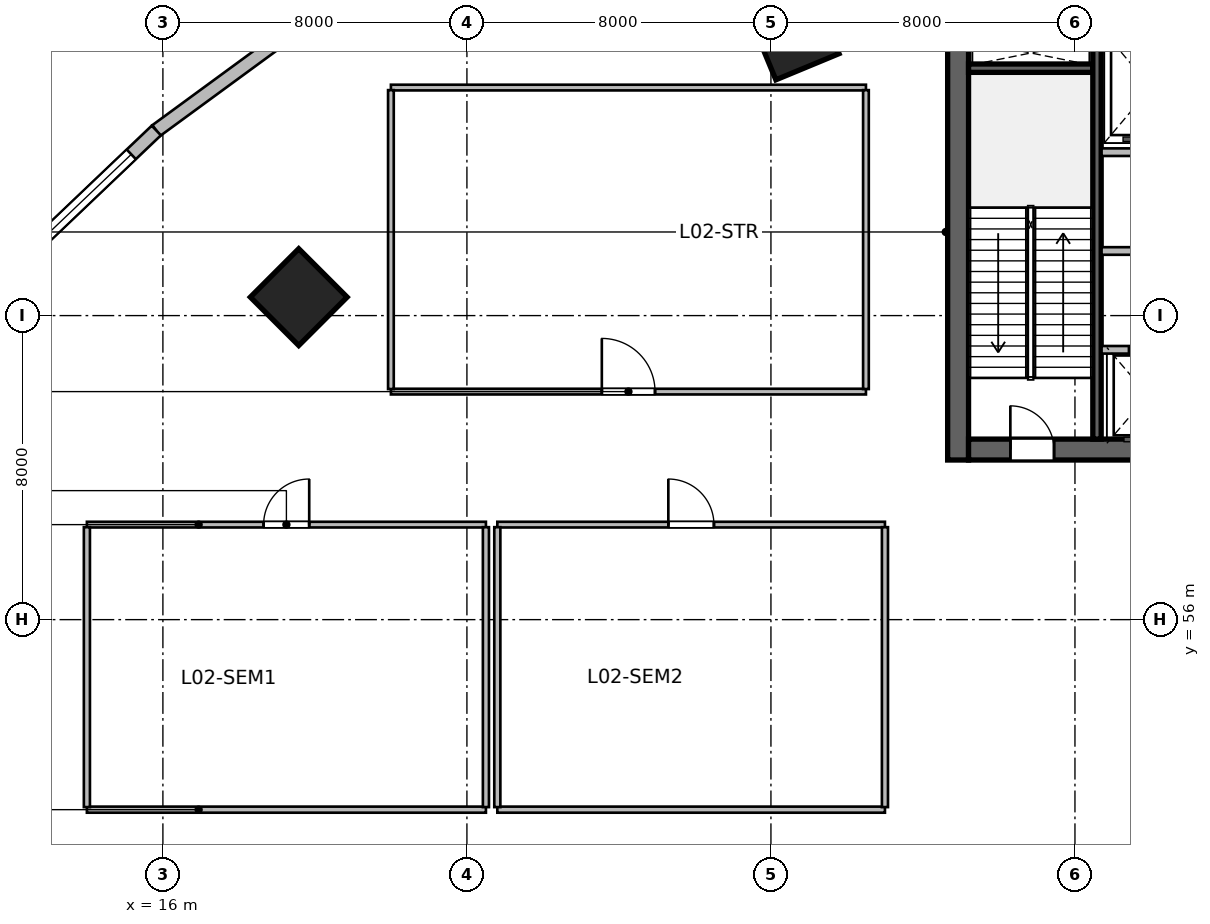
"""IFC4 building model, lengths in metres.
Left out: names, types, materials, properties, quantities, classifications, styles, units other than length and angle.
Written with IfcOpenShell. Run it as: python <this file> out.ifc"""

import sys

from ifc_helpers import new_model, si_unit, direction, frame, frame_2d, origin, origin_2d, place, context, subcontext, project, spatial, rectangle, extrude, source, transform, mapped, element, fill, save


model = new_model("IFC4")
c1 = context("Model", 3, precision=1e-05, world=origin(), true_north=direction((0.0, 1.0)))
c2 = subcontext(c1, "Body", "Model", "MODEL_VIEW")
j1 = project(units=[si_unit("LENGTHUNIT", "METRE"), si_unit("PLANEANGLEUNIT", "RADIAN")], contexts=[c1])
p1 = place(None, origin())
s1 = spatial("IfcSite", under=j1, at=p1, CompositionType="ELEMENT")
p2 = place(p1, origin())
s2 = spatial("IfcBuilding", under=s1, at=p2, CompositionType="ELEMENT")
p3 = place(p2, frame((0.0, 0.0, 12.0)))
s3 = spatial("IfcBuildingStorey", under=s2, at=p3, CompositionType="ELEMENT", Elevation=12.0)
m1 = source(origin(), c2, "Body", "SweptSolid", [
    extrude(rectangle(XDim=12.0, YDim=0.55, at=frame_2d((6.0, 0.0))), origin(), (0.0, 0.0, 1.0), 6.0),
])
p4 = place(p3, frame((36.925, 60.2, 0.0), z_axis=(0.0, 0.0, 1.0), x_axis=(0.0, 1.0, 0.0)))
e1 = element("IfcWall", 1, at=p4, inside=s3, PredefinedType="SHEAR", context=c2, shape_type="MappedRepresentation", body=[
    mapped(m1, transform((0.0, 0.0, 0.0), scale=1.0)),
])
m2 = source(origin(), c2, "Body", "SweptSolid", [
    extrude(rectangle(XDim=21.6, YDim=0.55, at=frame_2d((10.8, 0.0))), origin(), (0.0, 0.0, 1.0), 6.0),
])
p5 = place(p3, frame((37.2, 60.475, 0.0), z_axis=(0.0, 0.0, 1.0), x_axis=(1.0, 0.0, 0.0)))
e2 = element("IfcWall", 2, at=p5, inside=s3, PredefinedType="SHEAR", context=c2, shape_type="MappedRepresentation", body=[
    mapped(m2, transform((0.0, 0.0, 0.0), scale=1.0)),
])
p6 = place(p5, frame((1.1, 0.0, 0.0)))
e3 = element("IfcOpeningElement", 3, at=p6, cuts=e2, PredefinedType="OPENING", context=c2, shape_type="SweptSolid", body=[
    extrude(rectangle(XDim=1.15, YDim=2.15, at=frame_2d((0.575, 1.075))), frame((0.0, 0.285, 0.0), z_axis=(0.0, -1.0, 0.0), x_axis=(1.0, 0.0, 0.0)), (0.0, 0.0, 1.0), 0.57),
])
p7 = place(p5, frame((19.5, 0.0, 0.0)))
e4 = element("IfcOpeningElement", 4, at=p7, cuts=e2, PredefinedType="OPENING", context=c2, shape_type="SweptSolid", body=[
    extrude(rectangle(XDim=0.9, YDim=2.1, at=frame_2d((0.45, 1.05))), frame((0.0, 0.285, 0.0), z_axis=(0.0, -1.0, 0.0), x_axis=(1.0, 0.0, 0.0)), (0.0, 0.0, 1.0), 0.57),
])
p8 = place(p5, frame((12.02, 0.0, 0.0)))
e5 = element("IfcOpeningElement", 5, at=p8, cuts=e2, PredefinedType="OPENING", context=c2, shape_type="SweptSolid", body=[
    extrude(rectangle(XDim=1.6, YDim=2.15, at=frame_2d((0.8, 1.075))), frame((0.0, 0.285, 0.0), z_axis=(0.0, -1.0, 0.0), x_axis=(1.0, 0.0, 0.0)), (0.0, 0.0, 1.0), 0.57),
])
m3 = source(origin(), c2, "Body", "SweptSolid", [
    extrude(rectangle(XDim=3.27, YDim=0.22, at=frame_2d((1.635, 0.0))), origin(), (0.0, 0.0, 1.0), 6.0),
])
p9 = place(p3, frame((37.2, 70.51, 0.0), z_axis=(0.0, 0.0, 1.0), x_axis=(1.0, 0.0, 0.0)))
e6 = element("IfcWall", 6, at=p9, inside=s3, PredefinedType="SHEAR", context=c2, shape_type="MappedRepresentation", body=[
    mapped(m3, transform((0.0, 0.0, 0.0), scale=1.0)),
])
m4 = source(origin(), c2, "Body", "SweptSolid", [
    extrude(rectangle(XDim=10.9, YDim=0.22, at=frame_2d((5.45, 0.0))), origin(), (0.0, 0.0, 1.0), 6.0),
])
p10 = place(p3, frame((40.58, 60.75, 0.0), z_axis=(0.0, 0.0, 1.0), x_axis=(0.0, 1.0, 0.0)))
e7 = element("IfcWall", 7, at=p10, inside=s3, PredefinedType="SHEAR", context=c2, shape_type="MappedRepresentation", body=[
    mapped(m4, transform((0.0, 0.0, 0.0), scale=1.0)),
])
m5 = source(origin(), c2, "Body", "SweptSolid", [
    extrude(rectangle(XDim=1.8, YDim=1.8, at=origin_2d()), origin(), (0.0, 0.0, 1.0), 6.0),
])
for number, where, z_axis, x_axis in (
    (8, (32.616, 71.379, 0.0), (0.0, 0.0, 1.0), (-0.383, 0.924, 0.0)),
    (9, (19.574, 64.486, 0.0), (0.0, 0.0, 1.0), (-0.707, 0.707, 0.0)),
):
    element("IfcColumn", number, at=place(p3, frame(where, z_axis=z_axis, x_axis=x_axis)), inside=s3, PredefinedType="COLUMN", context=c2, shape_type="MappedRepresentation", body=[
        mapped(m5, transform((0.0, 0.0, 0.0), scale=1.0)),
    ])
m6 = source(origin(), c2, "Body", "SweptSolid", [
    extrude(rectangle(XDim=5.547, YDim=0.35, at=frame_2d((2.773, 0.0))), origin(), (0.0, 0.0, 1.0), 5.7),
])
p11 = place(p3, frame((20.302, 72.147, 0.0), z_axis=(0.0, 0.0, 1.0), x_axis=(-0.806767275837, -0.590869327887, 0.0)))
e10 = element("IfcWall", 10, at=p11, inside=s3, PredefinedType="SOLIDWALL", context=c2, shape_type="MappedRepresentation", body=[
    mapped(m6, transform((0.0, 0.0, 0.0), scale=1.0)),
])
m7 = source(origin(), c2, "Body", "SweptSolid", [
    extrude(rectangle(XDim=5.419, YDim=0.35, at=frame_2d((2.709, 0.0))), origin(), (0.0, 0.0, 1.0), 5.7),
])
p12 = place(p3, frame((15.827, 68.87, 0.0), z_axis=(0.0, 0.0, 1.0), x_axis=(-0.724150787336, -0.689641673046, 0.0)))
e11 = element("IfcWall", 11, at=p12, inside=s3, PredefinedType="SOLIDWALL", context=c2, shape_type="MappedRepresentation", body=[
    mapped(m7, transform((0.0, 0.0, 0.0), scale=1.0)),
])
p13 = place(p12, frame((0.909, 0.0, 1.05)))
e12 = element("IfcOpeningElement", 12, at=p13, cuts=e11, PredefinedType="OPENING", context=c2, shape_type="SweptSolid", body=[
    extrude(rectangle(XDim=3.6, YDim=2.8, at=frame_2d((1.8, 1.4))), frame((0.0, 0.185, 0.0), z_axis=(0.0, -1.0, 0.0), x_axis=(1.0, 0.0, 0.0)), (0.0, 0.0, 1.0), 0.37),
])
m8 = source(origin(), c2, "Body", "SweptSolid", [
    extrude(rectangle(XDim=8.8, YDim=0.2, at=frame_2d((4.4, 0.0))), origin(), (0.0, 0.0, 1.0), 5.7),
])
p14 = place(p3, frame((40.7, 68.3, 0.0), z_axis=(0.0, 0.0, 1.0), x_axis=(1.0, 0.0, 0.0)))
e13 = element("IfcWall", 13, at=p14, inside=s3, PredefinedType="SOLIDWALL", context=c2, shape_type="MappedRepresentation", body=[
    mapped(m8, transform((0.0, 0.0, 0.0), scale=1.0)),
])
m9 = source(origin(), c2, "Body", "SweptSolid", [
    extrude(rectangle(XDim=8.02, YDim=0.2, at=frame_2d((4.01, 0.0))), origin(), (0.0, 0.0, 1.0), 5.7),
])
p15 = place(p3, frame((40.7, 63.1, 0.0), z_axis=(0.0, 0.0, 1.0), x_axis=(1.0, 0.0, 0.0)))
e14 = element("IfcWall", 14, at=p15, inside=s3, PredefinedType="SOLIDWALL", context=c2, shape_type="MappedRepresentation", body=[
    mapped(m9, transform((0.0, 0.0, 0.0), scale=1.0)),
])
p16 = place(p15, frame((0.72, 0.0, 0.0)))
e15 = element("IfcOpeningElement", 15, at=p16, cuts=e14, PredefinedType="OPENING", context=c2, shape_type="SweptSolid", body=[
    extrude(rectangle(XDim=1.0, YDim=2.15, at=frame_2d((0.5, 1.075))), frame((0.0, 0.11, 0.0), z_axis=(0.0, -1.0, 0.0), x_axis=(1.0, 0.0, 0.0)), (0.0, 0.0, 1.0), 0.22),
])
p17 = place(p15, frame((2.62, 0.0, 0.0)))
e16 = element("IfcOpeningElement", 16, at=p17, cuts=e14, PredefinedType="OPENING", context=c2, shape_type="SweptSolid", body=[
    extrude(rectangle(XDim=1.0, YDim=2.15, at=frame_2d((0.5, 1.075))), frame((0.0, 0.11, 0.0), z_axis=(0.0, -1.0, 0.0), x_axis=(1.0, 0.0, 0.0)), (0.0, 0.0, 1.0), 0.22),
])
p18 = place(p15, frame((4.55, 0.0, 0.0)))
e17 = element("IfcOpeningElement", 17, at=p18, cuts=e14, PredefinedType="OPENING", context=c2, shape_type="SweptSolid", body=[
    extrude(rectangle(XDim=1.0, YDim=2.15, at=frame_2d((0.5, 1.075))), frame((0.0, 0.11, 0.0), z_axis=(0.0, -1.0, 0.0), x_axis=(1.0, 0.0, 0.0)), (0.0, 0.0, 1.0), 0.22),
])
p19 = place(p15, frame((6.55, 0.0, 0.0)))
e18 = element("IfcOpeningElement", 18, at=p19, cuts=e14, PredefinedType="OPENING", context=c2, shape_type="SweptSolid", body=[
    extrude(rectangle(XDim=1.0, YDim=2.15, at=frame_2d((0.5, 1.075))), frame((0.0, 0.11, 0.0), z_axis=(0.0, -1.0, 0.0), x_axis=(1.0, 0.0, 0.0)), (0.0, 0.0, 1.0), 0.22),
])
p20 = place(p3, frame((40.7, 65.7, 0.0), z_axis=(0.0, 0.0, 1.0), x_axis=(1.0, 0.0, 0.0)))
e19 = element("IfcWall", 19, at=p20, inside=s3, PredefinedType="SOLIDWALL", context=c2, shape_type="MappedRepresentation", body=[
    mapped(m8, transform((0.0, 0.0, 0.0), scale=1.0)),
])
p21 = place(p20, frame((3.8, 0.0, 0.0)))
e20 = element("IfcOpeningElement", 20, at=p21, cuts=e19, PredefinedType="OPENING", context=c2, shape_type="SweptSolid", body=[
    extrude(rectangle(XDim=0.95, YDim=2.15, at=frame_2d((0.475, 1.075))), frame((0.0, 0.11, 0.0), z_axis=(0.0, -1.0, 0.0), x_axis=(1.0, 0.0, 0.0)), (0.0, 0.0, 1.0), 0.22),
])
m10 = source(origin(), c2, "Body", "SweptSolid", [
    extrude(rectangle(XDim=10.5, YDim=0.16, at=frame_2d((5.25, 0.0))), origin(), (0.0, 0.0, 1.0), 5.7),
])
p22 = place(p3, frame((14.0, 51.0, 0.0), z_axis=(0.0, 0.0, 1.0), x_axis=(1.0, 0.0, 0.0)))
e21 = element("IfcWall", 21, at=p22, inside=s3, PredefinedType="MOVABLE", context=c2, shape_type="MappedRepresentation", body=[
    mapped(m10, transform((0.0, 0.0, 0.0), scale=1.0)),
])
m11 = source(origin(), c2, "Body", "SweptSolid", [
    extrude(rectangle(XDim=10.5, YDim=0.15, at=frame_2d((5.25, 0.0))), origin(), (0.0, 0.0, 1.0), 5.7),
])
p23 = place(p3, frame((14.0, 58.5, 0.0), z_axis=(0.0, 0.0, 1.0), x_axis=(1.0, 0.0, 0.0)))
e22 = element("IfcWall", 22, at=p23, inside=s3, PredefinedType="PARTITIONING", context=c2, shape_type="MappedRepresentation", body=[
    mapped(m11, transform((0.0, 0.0, 0.0), scale=1.0)),
])
p24 = place(p23, frame((4.65, 0.0, 0.0)))
e23 = element("IfcOpeningElement", 23, at=p24, cuts=e22, PredefinedType="OPENING", context=c2, shape_type="SweptSolid", body=[
    extrude(rectangle(XDim=1.2, YDim=2.15, at=frame_2d((0.6, 1.075))), frame((0.0, 0.085, 0.0), z_axis=(0.0, -1.0, 0.0), x_axis=(1.0, 0.0, 0.0)), (0.0, 0.0, 1.0), 0.17),
])
m12 = source(origin(), c2, "Body", "SweptSolid", [
    extrude(rectangle(XDim=7.365, YDim=0.16, at=frame_2d((3.683, 0.0))), origin(), (0.0, 0.0, 1.0), 5.7),
])
for number, where, z_axis, x_axis in (
    (24, (14.0, 51.067, 0.0), (0.0, 0.0, 1.0), (0.0, 1.0, 0.0)),
    (25, (24.5, 51.067, 0.0), (0.0, 0.0, 1.0), (0.0, 1.0, 0.0)),
):
    element("IfcWall", number, at=place(p3, frame(where, z_axis=z_axis, x_axis=x_axis)), inside=s3, PredefinedType="MOVABLE", context=c2, shape_type="MappedRepresentation", body=[
        mapped(m12, transform((0.0, 0.0, 0.0), scale=1.0)),
    ])
m13 = source(origin(), c2, "Body", "SweptSolid", [
    extrude(rectangle(XDim=10.2, YDim=0.16, at=frame_2d((5.1, 0.0))), origin(), (0.0, 0.0, 1.0), 5.7),
])
p25 = place(p3, frame((24.8, 51.0, 0.0), z_axis=(0.0, 0.0, 1.0), x_axis=(1.0, 0.0, 0.0)))
e26 = element("IfcWall", 26, at=p25, inside=s3, PredefinedType="MOVABLE", context=c2, shape_type="MappedRepresentation", body=[
    mapped(m13, transform((0.0, 0.0, 0.0), scale=1.0)),
])
m14 = source(origin(), c2, "Body", "SweptSolid", [
    extrude(rectangle(XDim=10.2, YDim=0.15, at=frame_2d((5.1, 0.0))), origin(), (0.0, 0.0, 1.0), 4.834),
])
p26 = place(p3, frame((24.8, 58.5, 0.0), z_axis=(0.0, 0.0, 1.0), x_axis=(1.0, 0.0, 0.0)))
e27 = element("IfcWall", 27, at=p26, inside=s3, PredefinedType="PARTITIONING", context=c2, shape_type="MappedRepresentation", body=[
    mapped(m14, transform((0.0, 0.0, 0.0), scale=1.0)),
])
p27 = place(p26, frame((4.5, 0.0, 0.0)))
e28 = element("IfcOpeningElement", 28, at=p27, cuts=e27, PredefinedType="OPENING", context=c2, shape_type="SweptSolid", body=[
    extrude(rectangle(XDim=1.2, YDim=2.15, at=frame_2d((0.6, 1.075))), frame((0.0, 0.085, 0.0), z_axis=(0.0, -1.0, 0.0), x_axis=(1.0, 0.0, 0.0)), (0.0, 0.0, 1.0), 0.17),
])
p28 = place(p3, frame((24.8, 51.067, 0.0), z_axis=(0.0, 0.0, 1.0), x_axis=(0.0, 1.0, 0.0)))
e29 = element("IfcWall", 29, at=p28, inside=s3, PredefinedType="MOVABLE", context=c2, shape_type="MappedRepresentation", body=[
    mapped(m12, transform((0.0, 0.0, 0.0), scale=1.0)),
])
m15 = source(origin(), c2, "Body", "SweptSolid", [
    extrude(rectangle(XDim=7.365, YDim=0.16, at=frame_2d((3.683, 0.0))), origin(), (0.0, 0.0, 1.0), 4.834),
])
p29 = place(p3, frame((35.0, 51.067, 0.0), z_axis=(0.0, 0.0, 1.0), x_axis=(0.0, 1.0, 0.0)))
e30 = element("IfcWall", 30, at=p29, inside=s3, PredefinedType="MOVABLE", context=c2, shape_type="MappedRepresentation", body=[
    mapped(m15, transform((0.0, 0.0, 0.0), scale=1.0)),
])
m16 = source(origin(), c2, "Body", "SweptSolid", [
    extrude(rectangle(XDim=12.5, YDim=0.15, at=frame_2d((6.25, 0.0))), origin(), (0.0, 0.0, 1.0), 5.7),
])
p30 = place(p3, frame((22.0, 62.0, 0.0), z_axis=(0.0, 0.0, 1.0), x_axis=(1.0, 0.0, 0.0)))
e31 = element("IfcWall", 31, at=p30, inside=s3, PredefinedType="PARTITIONING", context=c2, shape_type="MappedRepresentation", body=[
    mapped(m16, transform((0.0, 0.0, 0.0), scale=1.0)),
])
p31 = place(p30, frame((5.55, 0.0, 0.0)))
e32 = element("IfcOpeningElement", 32, at=p31, cuts=e31, PredefinedType="OPENING", context=c2, shape_type="SweptSolid", body=[
    extrude(rectangle(XDim=1.4, YDim=2.15, at=frame_2d((0.7, 1.075))), frame((0.0, 0.085, 0.0), z_axis=(0.0, -1.0, 0.0), x_axis=(1.0, 0.0, 0.0)), (0.0, 0.0, 1.0), 0.17),
])
m17 = source(origin(), c2, "Body", "SweptSolid", [
    extrude(rectangle(XDim=12.5, YDim=0.15, at=frame_2d((6.25, 0.0))), origin(), (0.0, 0.0, 1.0), 4.761),
])
p32 = place(p3, frame((22.0, 70.0, 0.0), z_axis=(0.0, 0.0, 1.0), x_axis=(1.0, 0.0, 0.0)))
e33 = element("IfcWall", 33, at=p32, inside=s3, PredefinedType="PARTITIONING", context=c2, shape_type="MappedRepresentation", body=[
    mapped(m17, transform((0.0, 0.0, 0.0), scale=1.0)),
])
m18 = source(origin(), c2, "Body", "SweptSolid", [
    extrude(rectangle(XDim=7.865, YDim=0.15, at=frame_2d((3.933, 0.0))), origin(), (0.0, 0.0, 1.0), 5.7),
])
for number, where, z_axis, x_axis in (
    (34, (22.0, 62.067, 0.0), (0.0, 0.0, 1.0), (0.0, 1.0, 0.0)),
    (35, (34.5, 62.067, 0.0), (0.0, 0.0, 1.0), (0.0, 1.0, 0.0)),
):
    element("IfcWall", number, at=place(p3, frame(where, z_axis=z_axis, x_axis=x_axis)), inside=s3, PredefinedType="PARTITIONING", context=c2, shape_type="MappedRepresentation", body=[
        mapped(m18, transform((0.0, 0.0, 0.0), scale=1.0)),
    ])
m19 = source(origin(), c2, "Body", "SweptSolid", [
    extrude(rectangle(XDim=3.6, YDim=2.8, at=frame_2d((1.8, 1.4))), frame((0.0, 0.03, 0.0), z_axis=(0.0, -1.0, 0.0), x_axis=(1.0, 0.0, 0.0)), (0.0, 0.0, 1.0), 0.06),
])
p33 = place(p13, origin())
e36 = element("IfcWindow", 36, at=p33, inside=s3, PartitioningType="TRIPLE_PANEL_VERTICAL", PredefinedType="WINDOW", context=c2, shape_type="MappedRepresentation", body=[
    mapped(m19, transform((0.0, 0.0, 0.0), scale=1.0)),
])
fill(e12, e36)
m20 = source(origin(), c2, "Body", "SweptSolid", [
    extrude(rectangle(XDim=1.15, YDim=2.15, at=frame_2d((0.575, 1.075))), frame((0.0, 0.025, 0.0), z_axis=(0.0, -1.0, 0.0), x_axis=(1.0, 0.0, 0.0)), (0.0, 0.0, 1.0), 0.05),
])
p34 = place(p6, origin())
e37 = element("IfcDoor", 37, at=p34, inside=s3, OperationType="SINGLE_SWING_LEFT", PredefinedType="DOOR", context=c2, shape_type="MappedRepresentation", body=[
    mapped(m20, transform((0.0, 0.0, 0.0), scale=1.0)),
])
fill(e3, e37)
m21 = source(origin(), c2, "Body", "SweptSolid", [
    extrude(rectangle(XDim=1.0, YDim=2.15, at=frame_2d((0.5, 1.075))), frame((0.0, 0.025, 0.0), z_axis=(0.0, -1.0, 0.0), x_axis=(1.0, 0.0, 0.0)), (0.0, 0.0, 1.0), 0.05),
])
p35 = place(p16, origin())
e38 = element("IfcDoor", 38, at=p35, inside=s3, OperationType="DOUBLE_DOOR_SLIDING", PredefinedType="DOOR", context=c2, shape_type="MappedRepresentation", body=[
    mapped(m21, transform((0.0, 0.0, 0.0), scale=1.0)),
])
fill(e15, e38)
m22 = source(origin(), c2, "Body", "SweptSolid", [
    extrude(rectangle(XDim=1.2, YDim=2.15, at=frame_2d((0.6, 1.075))), frame((0.0, 0.025, 0.0), z_axis=(0.0, -1.0, 0.0), x_axis=(1.0, 0.0, 0.0)), (0.0, 0.0, 1.0), 0.05),
])
p36 = place(p24, origin())
e39 = element("IfcDoor", 39, at=p36, inside=s3, OperationType="SINGLE_SWING_RIGHT", PredefinedType="DOOR", context=c2, shape_type="MappedRepresentation", body=[
    mapped(m22, transform((0.0, 0.0, 0.0), scale=1.0)),
])
fill(e23, e39)
p37 = place(p27, origin())
e40 = element("IfcDoor", 40, at=p37, inside=s3, OperationType="SINGLE_SWING_LEFT", PredefinedType="DOOR", context=c2, shape_type="MappedRepresentation", body=[
    mapped(m22, transform((0.0, 0.0, 0.0), scale=1.0)),
])
fill(e28, e40)
m23 = source(origin(), c2, "Body", "SweptSolid", [
    extrude(rectangle(XDim=1.4, YDim=2.15, at=frame_2d((0.7, 1.075))), frame((0.0, 0.025, 0.0), z_axis=(0.0, -1.0, 0.0), x_axis=(1.0, 0.0, 0.0)), (0.0, 0.0, 1.0), 0.05),
])
p38 = place(p31, origin())
e41 = element("IfcDoor", 41, at=p38, inside=s3, OperationType="SINGLE_SWING_LEFT", PredefinedType="DOOR", context=c2, shape_type="MappedRepresentation", body=[
    mapped(m23, transform((0.0, 0.0, 0.0), scale=1.0)),
])
fill(e32, e41)
save(model, sys.argv[1])
